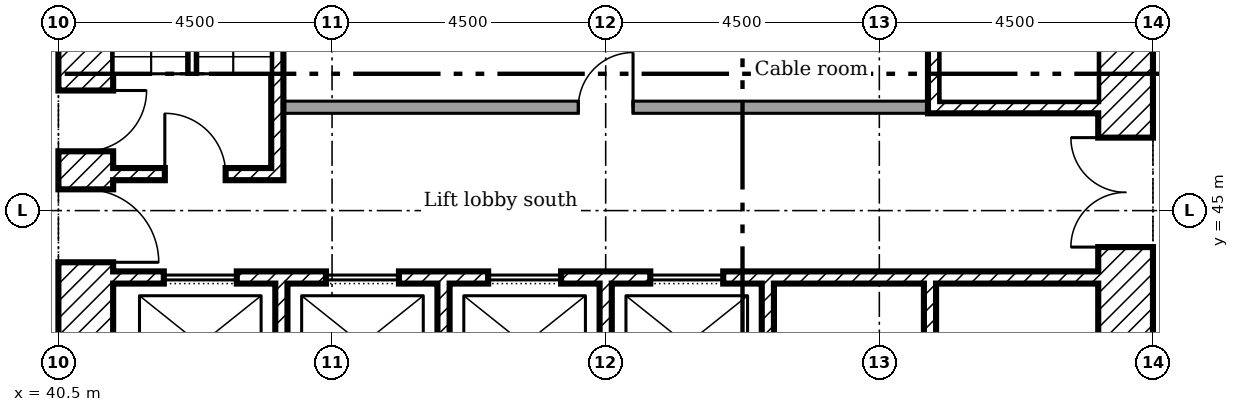
"""IFC4 building model, lengths in metres.
Left out: names, types, materials, properties, quantities, classifications, styles, units other than length and angle.
Written with IfcOpenShell. Run it as: python <this file> out.ifc"""

import sys

from ifc_helpers import new_model, si_unit, direction, frame, frame_2d, origin, place, context, subcontext, project, spatial, rectangle, extrude, element, fill, save


model = new_model("IFC4")
c1 = context("Model", 3, precision=1e-05, world=origin(), true_north=direction((0.0, 1.0)))
c2 = subcontext(c1, "Body", "Model", "MODEL_VIEW")
j1 = project(units=[si_unit("LENGTHUNIT", "METRE"), si_unit("PLANEANGLEUNIT", "RADIAN")], contexts=[c1])
p1 = place(None, origin())
s1 = spatial("IfcSite", under=j1, at=p1, CompositionType="ELEMENT")
p2 = place(p1, origin())
s2 = spatial("IfcBuilding", under=s1, at=p2, CompositionType="ELEMENT")
p3 = place(p2, frame((0.0, 0.0, 34.2)))
s3 = spatial("IfcBuildingStorey", under=s2, at=p3, CompositionType="ELEMENT", Elevation=34.2)
p4 = place(p3, frame((58.05, 40.5, 0.0), z_axis=(0.0, 0.0, 1.0), x_axis=(0.0, 1.0, 0.0)))
e1 = element("IfcWall", 1, at=p4, inside=s3, PredefinedType="SHEAR", context=c2, shape_type="SweptSolid", body=[
    extrude(rectangle(XDim=18.0, YDim=0.9, at=frame_2d((9.0, 0.0))), origin(), (0.0, 0.0, 1.0), 4.125),
])
p5 = place(p4, frame((13.15, 0.0, 0.0)))
e2 = element("IfcOpeningElement", 2, at=p5, cuts=e1, PredefinedType="OPENING", context=c2, shape_type="SweptSolid", body=[
    extrude(rectangle(XDim=1.2, YDim=2.1, at=frame_2d((0.6, 1.05))), frame((0.0, 0.46, 0.0), z_axis=(0.0, -1.0, 0.0), x_axis=(1.0, 0.0, 0.0)), (0.0, 0.0, 1.0), 0.92),
])
p6 = place(p4, frame((3.9, 0.0, 0.0)))
e3 = element("IfcOpeningElement", 3, at=p6, cuts=e1, PredefinedType="OPENING", context=c2, shape_type="SweptSolid", body=[
    extrude(rectangle(XDim=1.8, YDim=2.1, at=frame_2d((0.9, 1.05))), frame((0.0, 0.46, 0.0), z_axis=(0.0, -1.0, 0.0), x_axis=(1.0, 0.0, 0.0)), (0.0, 0.0, 1.0), 0.92),
])
p7 = place(p4, frame((11.525, 0.0, 0.0)))
e4 = element("IfcOpeningElement", 4, at=p7, cuts=e1, PredefinedType="OPENING", context=c2, shape_type="SweptSolid", body=[
    extrude(rectangle(XDim=1.0, YDim=2.1, at=frame_2d((0.5, 1.05))), frame((0.0, 0.46, 0.0), z_axis=(0.0, -1.0, 0.0), x_axis=(1.0, 0.0, 0.0)), (0.0, 0.0, 1.0), 0.92),
])
p8 = place(p3, frame((40.95, 40.5, 0.0), z_axis=(0.0, 0.0, 1.0), x_axis=(0.0, 1.0, 0.0)))
e5 = element("IfcWall", 5, at=p8, inside=s3, PredefinedType="SHEAR", context=c2, shape_type="SweptSolid", body=[
    extrude(rectangle(XDim=18.0, YDim=0.9, at=frame_2d((9.0, 0.0))), origin(), (0.0, 0.0, 1.0), 4.125),
])
p9 = place(p8, frame((3.65, 0.0, 0.0)))
e6 = element("IfcOpeningElement", 6, at=p9, cuts=e5, PredefinedType="OPENING", context=c2, shape_type="SweptSolid", body=[
    extrude(rectangle(XDim=1.2, YDim=2.1, at=frame_2d((0.6, 1.05))), frame((0.0, 0.46, 0.0), z_axis=(0.0, -1.0, 0.0), x_axis=(1.0, 0.0, 0.0)), (0.0, 0.0, 1.0), 0.92),
])
p10 = place(p8, frame((5.475, 0.0, 0.0)))
e7 = element("IfcOpeningElement", 7, at=p10, cuts=e5, PredefinedType="OPENING", context=c2, shape_type="SweptSolid", body=[
    extrude(rectangle(XDim=1.0, YDim=2.1, at=frame_2d((0.5, 1.05))), frame((0.0, 0.46, 0.0), z_axis=(0.0, -1.0, 0.0), x_axis=(1.0, 0.0, 0.0)), (0.0, 0.0, 1.0), 0.92),
])
p11 = place(p8, frame((12.3, 0.0, 0.0)))
e8 = element("IfcOpeningElement", 8, at=p11, cuts=e5, PredefinedType="OPENING", context=c2, shape_type="SweptSolid", body=[
    extrude(rectangle(XDim=1.0, YDim=2.1, at=frame_2d((0.5, 1.05))), frame((0.0, 0.46, 0.0), z_axis=(0.0, -1.0, 0.0), x_axis=(1.0, 0.0, 0.0)), (0.0, 0.0, 1.0), 0.92),
])
for number, where, z_axis, x_axis in (
    (9, (44.167, 41.4, 0.0), (0.0, 0.0, 1.0), (0.0, 1.0, 0.0)),
    (10, (46.833, 41.4, 0.0), (0.0, 0.0, 1.0), (0.0, 1.0, 0.0)),
    (11, (49.5, 41.4, 0.0), (0.0, 0.0, 1.0), (0.0, 1.0, 0.0)),
    (12, (52.167, 41.4, 0.0), (0.0, 0.0, 1.0), (0.0, 1.0, 0.0)),
    (13, (54.833, 41.4, 0.0), (0.0, 0.0, 1.0), (0.0, 1.0, 0.0)),
):
    element("IfcWall", number, at=place(p3, frame(where, z_axis=z_axis, x_axis=x_axis)), inside=s3, PredefinedType="SHEAR", context=c2, shape_type="SweptSolid", body=[
        extrude(rectangle(XDim=2.4, YDim=0.2, at=frame_2d((1.2, 0.0))), origin(), (0.0, 0.0, 1.0), 4.125),
    ])
p12 = place(p3, frame((41.4, 43.9, 0.0)))
e14 = element("IfcWall", 14, at=p12, inside=s3, PredefinedType="SHEAR", context=c2, shape_type="SweptSolid", body=[
    extrude(rectangle(XDim=16.2, YDim=0.2, at=frame_2d((8.1, 0.0))), origin(), (0.0, 0.0, 1.0), 4.125),
])
p13 = place(p12, frame((0.833, 0.0, 0.0)))
e15 = element("IfcOpeningElement", 15, at=p13, cuts=e14, PredefinedType="OPENING", context=c2, shape_type="SweptSolid", body=[
    extrude(rectangle(XDim=1.2, YDim=2.1, at=frame_2d((0.6, 1.05))), frame((0.0, 0.11, 0.0), z_axis=(0.0, -1.0, 0.0), x_axis=(1.0, 0.0, 0.0)), (0.0, 0.0, 1.0), 0.22),
])
p14 = place(p12, frame((3.5, 0.0, 0.0)))
e16 = element("IfcOpeningElement", 16, at=p14, cuts=e14, PredefinedType="OPENING", context=c2, shape_type="SweptSolid", body=[
    extrude(rectangle(XDim=1.2, YDim=2.1, at=frame_2d((0.6, 1.05))), frame((0.0, 0.11, 0.0), z_axis=(0.0, -1.0, 0.0), x_axis=(1.0, 0.0, 0.0)), (0.0, 0.0, 1.0), 0.22),
])
p15 = place(p12, frame((6.167, 0.0, 0.0)))
e17 = element("IfcOpeningElement", 17, at=p15, cuts=e14, PredefinedType="OPENING", context=c2, shape_type="SweptSolid", body=[
    extrude(rectangle(XDim=1.2, YDim=2.1, at=frame_2d((0.6, 1.05))), frame((0.0, 0.11, 0.0), z_axis=(0.0, -1.0, 0.0), x_axis=(1.0, 0.0, 0.0)), (0.0, 0.0, 1.0), 0.22),
])
p16 = place(p12, frame((8.833, 0.0, 0.0)))
e18 = element("IfcOpeningElement", 18, at=p16, cuts=e14, PredefinedType="OPENING", context=c2, shape_type="SweptSolid", body=[
    extrude(rectangle(XDim=1.2, YDim=2.1, at=frame_2d((0.6, 1.05))), frame((0.0, 0.11, 0.0), z_axis=(0.0, -1.0, 0.0), x_axis=(1.0, 0.0, 0.0)), (0.0, 0.0, 1.0), 0.22),
])
p17 = place(p3, frame((44.1, 45.5, 0.0), z_axis=(0.0, 0.0, 1.0), x_axis=(0.0, 1.0, 0.0)))
e19 = element("IfcWall", 19, at=p17, inside=s3, PredefinedType="SHEAR", context=c2, shape_type="SweptSolid", body=[
    extrude(rectangle(XDim=6.9, YDim=0.2, at=frame_2d((3.45, 0.0))), origin(), (0.0, 0.0, 1.0), 4.125),
])
p18 = place(p3, frame((41.4, 45.6, 0.0)))
e20 = element("IfcWall", 20, at=p18, inside=s3, PredefinedType="SHEAR", context=c2, shape_type="SweptSolid", body=[
    extrude(rectangle(XDim=2.6, YDim=0.2, at=frame_2d((1.3, 0.0))), origin(), (0.0, 0.0, 1.0), 4.125),
])
p19 = place(p18, frame((0.85, 0.0, 0.0)))
e21 = element("IfcOpeningElement", 21, at=p19, cuts=e20, PredefinedType="OPENING", context=c2, shape_type="SweptSolid", body=[
    extrude(rectangle(XDim=1.0, YDim=2.1, at=frame_2d((0.5, 1.05))), frame((0.0, 0.11, 0.0), z_axis=(0.0, -1.0, 0.0), x_axis=(1.0, 0.0, 0.0)), (0.0, 0.0, 1.0), 0.22),
])
p20 = place(p3, frame((54.8, 46.7, 0.0)))
e22 = element("IfcWall", 22, at=p20, inside=s3, PredefinedType="SHEAR", context=c2, shape_type="SweptSolid", body=[
    extrude(rectangle(XDim=2.8, YDim=0.2, at=frame_2d((1.4, 0.0))), origin(), (0.0, 0.0, 1.0), 4.125),
])
p21 = place(p3, frame((54.9, 46.8, 0.0), z_axis=(0.0, 0.0, 1.0), x_axis=(0.0, 1.0, 0.0)))
e23 = element("IfcWall", 23, at=p21, inside=s3, PredefinedType="SHEAR", context=c2, shape_type="SweptSolid", body=[
    extrude(rectangle(XDim=6.5, YDim=0.2, at=frame_2d((3.25, 0.0))), origin(), (0.0, 0.0, 1.0), 4.125),
])
p22 = place(p3, frame((44.2, 46.7, 0.0)))
e24 = element("IfcWall", 24, at=p22, inside=s3, PredefinedType="PARTITIONING", context=c2, shape_type="SweptSolid", body=[
    extrude(rectangle(XDim=10.6, YDim=0.2, at=frame_2d((5.3, 0.0))), origin(), (0.0, 0.0, 1.0), 4.125),
])
p23 = place(p22, frame((4.85, 0.0, 0.0)))
e25 = element("IfcOpeningElement", 25, at=p23, cuts=e24, PredefinedType="OPENING", context=c2, shape_type="SweptSolid", body=[
    extrude(rectangle(XDim=0.9, YDim=2.1, at=frame_2d((0.45, 1.05))), frame((0.0, 0.11, 0.0), z_axis=(0.0, -1.0, 0.0), x_axis=(1.0, 0.0, 0.0)), (0.0, 0.0, 1.0), 0.22),
])
p24 = place(p6, origin())
e26 = element("IfcDoor", 26, at=p24, inside=s3, OperationType="DOUBLE_DOOR_SINGLE_SWING", PredefinedType="DOOR", context=c2, shape_type="SweptSolid", body=[
    extrude(rectangle(XDim=1.8, YDim=2.1, at=frame_2d((0.9, 1.05))), frame((0.0, 0.025, 0.0), z_axis=(0.0, -1.0, 0.0), x_axis=(1.0, 0.0, 0.0)), (0.0, 0.0, 1.0), 0.05),
])
fill(e3, e26)
p25 = place(p9, frame((1.2, 0.0, 0.0), x_axis=(-1.0, 0.0, 0.0)))
e27 = element("IfcDoor", 27, at=p25, inside=s3, OperationType="SINGLE_SWING_LEFT", PredefinedType="DOOR", context=c2, shape_type="SweptSolid", body=[
    extrude(rectangle(XDim=1.2, YDim=2.1, at=frame_2d((0.6, 1.05))), frame((0.0, 0.025, 0.0), z_axis=(0.0, -1.0, 0.0), x_axis=(1.0, 0.0, 0.0)), (0.0, 0.0, 1.0), 0.05),
])
fill(e6, e27)
p26 = place(p19, origin())
e28 = element("IfcDoor", 28, at=p26, inside=s3, OperationType="SINGLE_SWING_RIGHT", PredefinedType="DOOR", context=c2, shape_type="SweptSolid", body=[
    extrude(rectangle(XDim=1.0, YDim=2.1, at=frame_2d((0.5, 1.05))), frame((0.0, 0.025, 0.0), z_axis=(0.0, -1.0, 0.0), x_axis=(1.0, 0.0, 0.0)), (0.0, 0.0, 1.0), 0.05),
])
fill(e21, e28)
p27 = place(p10, frame((1.0, 0.0, 0.0), x_axis=(-1.0, 0.0, 0.0)))
e29 = element("IfcDoor", 29, at=p27, inside=s3, OperationType="SINGLE_SWING_RIGHT", PredefinedType="DOOR", context=c2, shape_type="SweptSolid", body=[
    extrude(rectangle(XDim=1.0, YDim=2.1, at=frame_2d((0.5, 1.05))), frame((0.0, 0.025, 0.0), z_axis=(0.0, -1.0, 0.0), x_axis=(1.0, 0.0, 0.0)), (0.0, 0.0, 1.0), 0.05),
])
fill(e7, e29)
p28 = place(p23, origin())
e30 = element("IfcDoor", 30, at=p28, inside=s3, OperationType="SINGLE_SWING_LEFT", PredefinedType="DOOR", context=c2, shape_type="SweptSolid", body=[
    extrude(rectangle(XDim=0.9, YDim=2.1, at=frame_2d((0.45, 1.05))), frame((0.0, 0.025, 0.0), z_axis=(0.0, -1.0, 0.0), x_axis=(1.0, 0.0, 0.0)), (0.0, 0.0, 1.0), 0.05),
])
fill(e25, e30)
p29 = place(p13, origin())
e31 = element("IfcDoor", 31, at=p29, inside=s3, OperationType="SLIDING_TO_LEFT", PredefinedType="DOOR", context=c2, shape_type="SweptSolid", body=[
    extrude(rectangle(XDim=1.2, YDim=2.1, at=frame_2d((0.6, 1.05))), frame((0.0, 0.025, 0.0), z_axis=(0.0, -1.0, 0.0), x_axis=(1.0, 0.0, 0.0)), (0.0, 0.0, 1.0), 0.05),
])
fill(e15, e31)
p30 = place(p14, origin())
e32 = element("IfcDoor", 32, at=p30, inside=s3, OperationType="SLIDING_TO_LEFT", PredefinedType="DOOR", context=c2, shape_type="SweptSolid", body=[
    extrude(rectangle(XDim=1.2, YDim=2.1, at=frame_2d((0.6, 1.05))), frame((0.0, 0.025, 0.0), z_axis=(0.0, -1.0, 0.0), x_axis=(1.0, 0.0, 0.0)), (0.0, 0.0, 1.0), 0.05),
])
fill(e16, e32)
p31 = place(p15, origin())
e33 = element("IfcDoor", 33, at=p31, inside=s3, OperationType="SLIDING_TO_LEFT", PredefinedType="DOOR", context=c2, shape_type="SweptSolid", body=[
    extrude(rectangle(XDim=1.2, YDim=2.1, at=frame_2d((0.6, 1.05))), frame((0.0, 0.025, 0.0), z_axis=(0.0, -1.0, 0.0), x_axis=(1.0, 0.0, 0.0)), (0.0, 0.0, 1.0), 0.05),
])
fill(e17, e33)
p32 = place(p16, origin())
e34 = element("IfcDoor", 34, at=p32, inside=s3, OperationType="SLIDING_TO_LEFT", PredefinedType="DOOR", context=c2, shape_type="SweptSolid", body=[
    extrude(rectangle(XDim=1.2, YDim=2.1, at=frame_2d((0.6, 1.05))), frame((0.0, 0.025, 0.0), z_axis=(0.0, -1.0, 0.0), x_axis=(1.0, 0.0, 0.0)), (0.0, 0.0, 1.0), 0.05),
])
fill(e18, e34)
save(model, sys.argv[1])
